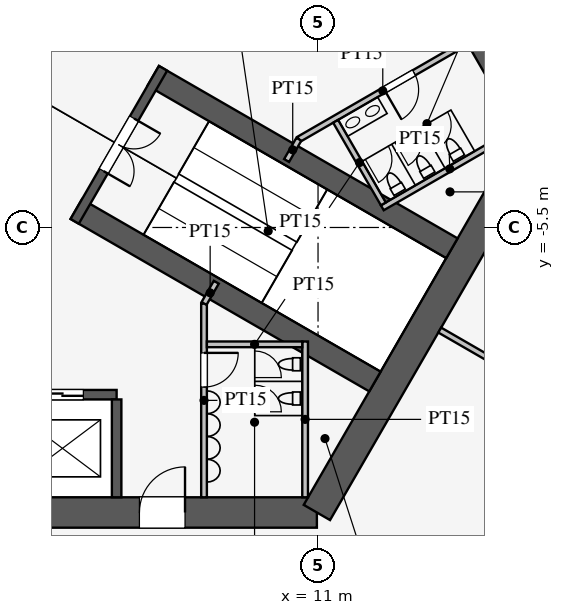
"""IFC4 building model, lengths in metres.
Left out: names, types, materials, properties, quantities, classifications, styles, units other than length and angle.
Written with IfcOpenShell. Run it as: python <this file> out.ifc"""

import sys

from ifc_helpers import new_model, si_unit, direction, frame, frame_2d, origin, place, context, subcontext, project, spatial, rectangle, extrude, element, fill, save


model = new_model("IFC4")
c1 = context("Model", 3, precision=1e-05, world=origin(), true_north=direction((0.0, 1.0)))
c2 = subcontext(c1, "Body", "Model", "MODEL_VIEW")
j1 = project(units=[si_unit("LENGTHUNIT", "METRE"), si_unit("PLANEANGLEUNIT", "RADIAN")], contexts=[c1])
p1 = place(None, origin())
s1 = spatial("IfcSite", under=j1, at=p1, CompositionType="ELEMENT")
p2 = place(p1, origin())
s2 = spatial("IfcBuilding", under=s1, at=p2, CompositionType="ELEMENT")
p3 = place(p2, frame((0.0, 0.0, 124.1)))
s3 = spatial("IfcBuildingStorey", under=s2, at=p3, CompositionType="ELEMENT", Elevation=124.1)
p4 = place(p3, frame((-10.97, -13.0, 0.0), z_axis=(0.0, 0.0, 1.0), x_axis=(1.0, 0.0, 0.0)))
e1 = element("IfcWall", 1, at=p4, inside=s3, PredefinedType="SHEAR", context=c2, shape_type="SweptSolid", body=[
    extrude(rectangle(XDim=21.939, YDim=0.8, at=frame_2d((10.97, 0.0))), origin(), (0.0, 0.0, 1.0), 4.2),
])
p5 = place(p4, frame((17.27, 0.0, 0.0)))
e2 = element("IfcOpeningElement", 2, at=p5, cuts=e1, PredefinedType="OPENING", context=c2, shape_type="SweptSolid", body=[
    extrude(rectangle(XDim=1.2, YDim=2.1, at=frame_2d((0.6, 1.05))), frame((0.0, 0.41, 0.0), z_axis=(0.0, -1.0, 0.0), x_axis=(1.0, 0.0, 0.0)), (0.0, 0.0, 1.0), 0.82),
])
p6 = place(p4, frame((3.47, 0.0, 0.0)))
e3 = element("IfcOpeningElement", 3, at=p6, cuts=e1, PredefinedType="OPENING", context=c2, shape_type="SweptSolid", body=[
    extrude(rectangle(XDim=1.2, YDim=2.1, at=frame_2d((0.6, 1.05))), frame((0.0, 0.41, 0.0), z_axis=(0.0, -1.0, 0.0), x_axis=(1.0, 0.0, 0.0)), (0.0, 0.0, 1.0), 0.82),
])
p7 = place(p3, frame((10.97, -13.0, 0.0), z_axis=(0.0, 0.0, 1.0), x_axis=(0.499995765644, 0.866027848477, 0.0)))
e4 = element("IfcWall", 4, at=p7, inside=s3, PredefinedType="SHEAR", context=c2, shape_type="SweptSolid", body=[
    extrude(rectangle(XDim=11.547, YDim=0.8, at=frame_2d((5.773, 0.0))), origin(), (0.0, 0.0, 1.0), 4.2),
])
p8 = place(p3, frame((16.743, -3.0, 0.0), z_axis=(0.0, 0.0, 1.0), x_axis=(-0.500002442456, 0.866023993627, 0.0)))
e5 = element("IfcWall", 5, at=p8, inside=s3, PredefinedType="SHEAR", context=c2, shape_type="SweptSolid", body=[
    extrude(rectangle(XDim=21.939, YDim=0.8, at=frame_2d((10.97, 0.0))), origin(), (0.0, 0.0, 1.0), 4.2),
])
p9 = place(p8, frame((17.27, 0.0, 0.0)))
e6 = element("IfcOpeningElement", 6, at=p9, cuts=e5, PredefinedType="OPENING", context=c2, shape_type="SweptSolid", body=[
    extrude(rectangle(XDim=1.2, YDim=2.1, at=frame_2d((0.6, 1.05))), frame((0.0, 0.41, 0.0), z_axis=(0.0, -1.0, 0.0), x_axis=(1.0, 0.0, 0.0)), (0.0, 0.0, 1.0), 0.82),
])
p10 = place(p8, frame((3.47, 0.0, 0.0)))
e7 = element("IfcOpeningElement", 7, at=p10, cuts=e5, PredefinedType="OPENING", context=c2, shape_type="SweptSolid", body=[
    extrude(rectangle(XDim=1.2, YDim=2.1, at=frame_2d((0.6, 1.05))), frame((0.0, 0.41, 0.0), z_axis=(0.0, -1.0, 0.0), x_axis=(1.0, 0.0, 0.0)), (0.0, 0.0, 1.0), 0.82),
])
p11 = place(p3, frame((-5.7, -9.9, 0.0), z_axis=(0.0, 0.0, 1.0), x_axis=(1.0, 0.0, 0.0)))
e8 = element("IfcWall", 8, at=p11, inside=s3, PredefinedType="SHEAR", context=c2, shape_type="SweptSolid", body=[
    extrude(rectangle(XDim=11.4, YDim=0.25, at=frame_2d((5.7, 0.0))), origin(), (0.0, 0.0, 1.0), 4.2),
])
p12 = place(p11, frame((0.875, 0.0, 0.0)))
e9 = element("IfcOpeningElement", 9, at=p12, cuts=e8, PredefinedType="OPENING", context=c2, shape_type="SweptSolid", body=[
    extrude(rectangle(XDim=1.1, YDim=2.2, at=frame_2d((0.55, 1.1))), frame((0.0, 0.135, 0.0), z_axis=(0.0, -1.0, 0.0), x_axis=(1.0, 0.0, 0.0)), (0.0, 0.0, 1.0), 0.27),
])
p13 = place(p11, frame((3.725, 0.0, 0.0)))
e10 = element("IfcOpeningElement", 10, at=p13, cuts=e8, PredefinedType="OPENING", context=c2, shape_type="SweptSolid", body=[
    extrude(rectangle(XDim=1.1, YDim=2.2, at=frame_2d((0.55, 1.1))), frame((0.0, 0.135, 0.0), z_axis=(0.0, -1.0, 0.0), x_axis=(1.0, 0.0, 0.0)), (0.0, 0.0, 1.0), 0.27),
])
p14 = place(p11, frame((6.575, 0.0, 0.0)))
e11 = element("IfcOpeningElement", 11, at=p14, cuts=e8, PredefinedType="OPENING", context=c2, shape_type="SweptSolid", body=[
    extrude(rectangle(XDim=1.1, YDim=2.2, at=frame_2d((0.55, 1.1))), frame((0.0, 0.135, 0.0), z_axis=(0.0, -1.0, 0.0), x_axis=(1.0, 0.0, 0.0)), (0.0, 0.0, 1.0), 0.27),
])
p15 = place(p11, frame((9.425, 0.0, 0.0)))
e12 = element("IfcOpeningElement", 12, at=p15, cuts=e8, PredefinedType="OPENING", context=c2, shape_type="SweptSolid", body=[
    extrude(rectangle(XDim=1.1, YDim=2.2, at=frame_2d((0.55, 1.1))), frame((0.0, 0.135, 0.0), z_axis=(0.0, -1.0, 0.0), x_axis=(1.0, 0.0, 0.0)), (0.0, 0.0, 1.0), 0.27),
])
p16 = place(p3, frame((5.7, -10.025, 0.0), z_axis=(0.0, 0.0, 1.0), x_axis=(0.0, -1.0, 0.0)))
e13 = element("IfcWall", 13, at=p16, inside=s3, PredefinedType="SHEAR", context=c2, shape_type="SweptSolid", body=[
    extrude(rectangle(XDim=2.575, YDim=0.25, at=frame_2d((1.288, 0.0))), origin(), (0.0, 0.0, 1.0), 4.2),
])
for number, where, z_axis, x_axis in (
    (14, (4.638, -5.016, 0.0), (0.0, 0.0, 1.0), (0.866, -0.5, 0.0)),
    (15, (6.663, -1.509, 0.0), (0.0, 0.0, 1.0), (0.866, -0.5, 0.0)),
):
    element("IfcWall", number, at=place(p3, frame(where, z_axis=z_axis, x_axis=x_axis)), inside=s3, PredefinedType="SHEAR", context=c2, shape_type="SweptSolid", body=[
        extrude(rectangle(XDim=9.075, YDim=0.6, at=frame_2d((4.538, 0.0))), origin(), (0.0, 0.0, 1.0), 4.2),
    ])
p17 = place(p3, frame((4.597, -5.339, 0.0), z_axis=(0.0, 0.0, 1.0), x_axis=(0.499984536904, 0.866034331223, 0.0)))
e16 = element("IfcWall", 16, at=p17, inside=s3, PredefinedType="SHEAR", context=c2, shape_type="SweptSolid", body=[
    extrude(rectangle(XDim=4.65, YDim=0.25, at=frame_2d((2.325, 0.0))), origin(), (0.0, 0.0, 1.0), 4.2),
])
p18 = place(p17, frame((1.525, 0.0, 0.0)))
e17 = element("IfcOpeningElement", 17, at=p18, cuts=e16, PredefinedType="OPENING", context=c2, shape_type="SweptSolid", body=[
    extrude(rectangle(XDim=1.6, YDim=2.1, at=frame_2d((0.8, 1.05))), frame((0.0, 0.135, 0.0), z_axis=(0.0, -1.0, 0.0), x_axis=(1.0, 0.0, 0.0)), (0.0, 0.0, 1.0), 0.27),
])
p19 = place(p3, frame((8.0, -7.5, 0.0), z_axis=(0.0, 0.0, 1.0), x_axis=(0.0, -1.0, 0.0)))
e18 = element("IfcWall", 18, at=p19, inside=s3, PredefinedType="PARTITIONING", context=c2, shape_type="SweptSolid", body=[
    extrude(rectangle(XDim=5.1, YDim=0.15, at=frame_2d((2.55, 0.0))), origin(), (0.0, 0.0, 1.0), 4.0),
])
p20 = place(p19, frame((1.3, 0.0, 0.0)))
e19 = element("IfcOpeningElement", 19, at=p20, cuts=e18, PredefinedType="OPENING", context=c2, shape_type="SweptSolid", body=[
    extrude(rectangle(XDim=0.9, YDim=2.1, at=frame_2d((0.45, 1.05))), frame((0.0, 0.085, 0.0), z_axis=(0.0, -1.0, 0.0), x_axis=(1.0, 0.0, 0.0)), (0.0, 0.0, 1.0), 0.17),
])
p21 = place(p3, frame((10.495, -3.178, 0.0), z_axis=(0.0, 0.0, 1.0), x_axis=(0.86602216432, 0.500005610874, 0.0)))
e20 = element("IfcWall", 20, at=p21, inside=s3, PredefinedType="PARTITIONING", context=c2, shape_type="SweptSolid", body=[
    extrude(rectangle(XDim=5.1, YDim=0.15, at=frame_2d((2.55, 0.0))), origin(), (0.0, 0.0, 1.0), 4.0),
])
p22 = place(p21, frame((2.6, 0.0, 0.0)))
e21 = element("IfcOpeningElement", 21, at=p22, cuts=e20, PredefinedType="OPENING", context=c2, shape_type="SweptSolid", body=[
    extrude(rectangle(XDim=0.9, YDim=2.1, at=frame_2d((0.45, 1.05))), frame((0.0, 0.085, 0.0), z_axis=(0.0, -1.0, 0.0), x_axis=(1.0, 0.0, 0.0)), (0.0, 0.0, 1.0), 0.17),
])
for number, where, z_axis, x_axis in (
    (22, (8.0, -7.5, 0.0), (0.0, 0.0, 1.0), (0.5, 0.866, 0.0)),
    (23, (10.495, -3.178, 0.0), (0.0, 0.0, 1.0), (-0.5, -0.866, 0.0)),
):
    element("IfcWall", number, at=place(p3, frame(where, z_axis=z_axis, x_axis=x_axis)), inside=s3, PredefinedType="PARTITIONING", context=c2, shape_type="SweptSolid", body=[
        extrude(rectangle(XDim=0.645, YDim=0.15, at=frame_2d((0.323, 0.0))), origin(), (0.0, 0.0, 1.0), 4.0),
    ])
p23 = place(p3, frame((10.66, -8.5, 0.0), z_axis=(0.0, 0.0, 1.0), x_axis=(0.0, -1.0, 0.0)))
e24 = element("IfcWall", 24, at=p23, inside=s3, PredefinedType="PARTITIONING", context=c2, shape_type="SweptSolid", body=[
    extrude(rectangle(XDim=4.1, YDim=0.15, at=frame_2d((2.05, 0.0))), origin(), (0.0, 0.0, 1.0), 4.0),
])
p24 = place(p3, frame((8.075, -8.575, 0.0), z_axis=(0.0, 0.0, 1.0), x_axis=(1.0, 0.0, 0.0)))
e25 = element("IfcWall", 25, at=p24, inside=s3, PredefinedType="PARTITIONING", context=c2, shape_type="SweptSolid", body=[
    extrude(rectangle(XDim=2.51, YDim=0.15, at=frame_2d((1.255, 0.0))), origin(), (0.0, 0.0, 1.0), 4.0),
])
p25 = place(p3, frame((12.691, -4.982, 0.0), z_axis=(0.0, 0.0, 1.0), x_axis=(0.8660249478, 0.500000789788, 0.0)))
e26 = element("IfcWall", 26, at=p25, inside=s3, PredefinedType="PARTITIONING", context=c2, shape_type="SweptSolid", body=[
    extrude(rectangle(XDim=4.1, YDim=0.15, at=frame_2d((2.05, 0.0))), origin(), (0.0, 0.0, 1.0), 4.0),
])
p26 = place(p3, frame((11.464, -2.706, 0.0), z_axis=(0.0, 0.0, 1.0), x_axis=(0.50001992892, -0.866013897511, 0.0)))
e27 = element("IfcWall", 27, at=p26, inside=s3, PredefinedType="PARTITIONING", context=c2, shape_type="SweptSolid", body=[
    extrude(rectangle(XDim=2.51, YDim=0.15, at=frame_2d((1.255, 0.0))), origin(), (0.0, 0.0, 1.0), 4.0),
])
p27 = place(p3, frame((14.203, -8.2, 0.0), z_axis=(0.0, 0.0, 1.0), x_axis=(0.866024668836, -0.500001272966, 0.0)))
e28 = element("IfcWall", 28, at=p27, inside=s3, PredefinedType="PARTITIONING", context=c2, shape_type="SweptSolid", body=[
    extrude(rectangle(XDim=16.65, YDim=0.15, at=frame_2d((8.325, 0.0))), origin(), (0.0, 0.0, 1.0), 2.3),
])
p28 = place(p20, origin())
e29 = element("IfcDoor", 29, at=p28, inside=s3, OperationType="SINGLE_SWING_LEFT", PredefinedType="DOOR", context=c2, shape_type="SweptSolid", body=[
    extrude(rectangle(XDim=0.9, YDim=2.1, at=frame_2d((0.45, 1.05))), frame((0.0, 0.025, 0.0), z_axis=(0.0, -1.0, 0.0), x_axis=(1.0, 0.0, 0.0)), (0.0, 0.0, 1.0), 0.05),
])
fill(e19, e29)
p29 = place(p22, frame((0.9, 0.0, 0.0), z_axis=(0.0, 0.0, 1.0), x_axis=(-1.0, 0.0, 0.0)))
e30 = element("IfcDoor", 30, at=p29, inside=s3, OperationType="SINGLE_SWING_RIGHT", PredefinedType="DOOR", context=c2, shape_type="SweptSolid", body=[
    extrude(rectangle(XDim=0.9, YDim=2.1, at=frame_2d((0.45, 1.05))), frame((0.0, 0.025, 0.0), z_axis=(0.0, -1.0, 0.0), x_axis=(1.0, 0.0, 0.0)), (0.0, 0.0, 1.0), 0.05),
])
fill(e21, e30)
p30 = place(p18, frame((1.6, 0.0, 0.0), z_axis=(0.0, 0.0, 1.0), x_axis=(-1.0, 0.0, 0.0)))
e31 = element("IfcDoor", 31, at=p30, inside=s3, OperationType="DOUBLE_DOOR_SINGLE_SWING", PredefinedType="DOOR", context=c2, shape_type="SweptSolid", body=[
    extrude(rectangle(XDim=1.6, YDim=2.1, at=frame_2d((0.8, 1.05))), frame((0.0, 0.025, 0.0), z_axis=(0.0, -1.0, 0.0), x_axis=(1.0, 0.0, 0.0)), (0.0, 0.0, 1.0), 0.05),
])
fill(e17, e31)
p31 = place(p5, origin())
e32 = element("IfcDoor", 32, at=p31, inside=s3, OperationType="SINGLE_SWING_RIGHT", PredefinedType="DOOR", context=c2, shape_type="SweptSolid", body=[
    extrude(rectangle(XDim=1.2, YDim=2.1, at=frame_2d((0.6, 1.05))), frame((0.0, 0.025, 0.0), z_axis=(0.0, -1.0, 0.0), x_axis=(1.0, 0.0, 0.0)), (0.0, 0.0, 1.0), 0.05),
])
fill(e2, e32)
p32 = place(p15, origin())
e33 = element("IfcDoor", 33, at=p32, inside=s3, OperationType="DOUBLE_DOOR_SLIDING", PredefinedType="DOOR", context=c2, shape_type="SweptSolid", body=[
    extrude(rectangle(XDim=1.1, YDim=2.2, at=frame_2d((0.55, 1.1))), frame((0.0, 0.025, 0.0), z_axis=(0.0, -1.0, 0.0), x_axis=(1.0, 0.0, 0.0)), (0.0, 0.0, 1.0), 0.05),
])
fill(e12, e33)
save(model, sys.argv[1])
